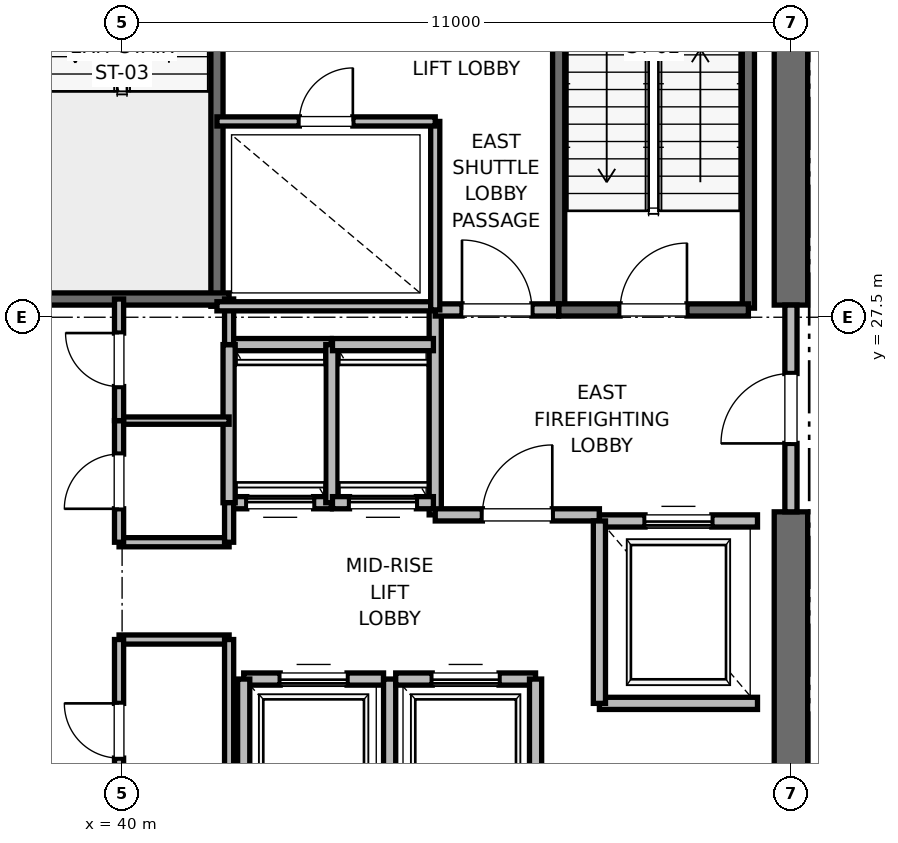
"""IFC4 building model, lengths in metres.
Left out: names, types, materials, properties, quantities, classifications, styles, units other than length and angle.
Written with IfcOpenShell. Run it as: python <this file> out.ifc"""

import sys

from ifc_helpers import new_model, si_unit, direction, frame, frame_2d, origin, place, context, subcontext, project, spatial, rectangle, extrude, element, fill, save


model = new_model("IFC4")
c1 = context("Model", 3, precision=1e-05, world=origin(), true_north=direction((0.0, 1.0)))
c2 = subcontext(c1, "Body", "Model", "MODEL_VIEW")
j1 = project(units=[si_unit("LENGTHUNIT", "METRE"), si_unit("PLANEANGLEUNIT", "RADIAN")], contexts=[c1])
p1 = place(None, origin())
s1 = spatial("IfcSite", under=j1, at=p1, CompositionType="ELEMENT")
p2 = place(p1, origin())
s2 = spatial("IfcBuilding", under=s1, at=p2, CompositionType="ELEMENT")
p3 = place(p2, frame((0.0, 0.0, 140.4)))
s3 = spatial("IfcBuildingStorey", under=s2, at=p3, CompositionType="ELEMENT", Elevation=140.4)
p4 = place(p3, frame((51.0, 18.5, 0.0), z_axis=(0.0, 0.0, 1.0), x_axis=(0.0, 1.0, 0.0)))
e1 = element("IfcWall", 1, at=p4, inside=s3, PredefinedType="SHEAR", context=c2, shape_type="SweptSolid", body=[
    extrude(rectangle(XDim=5.8, YDim=0.55, at=frame_2d((2.9, 0.0))), origin(), (0.0, 0.0, 1.0), 3.775),
])
p5 = place(p3, frame((51.0, 27.7, 0.0), z_axis=(0.0, 0.0, 1.0), x_axis=(0.0, 1.0, 0.0)))
e2 = element("IfcWall", 2, at=p5, inside=s3, PredefinedType="SHEAR", context=c2, shape_type="SweptSolid", body=[
    extrude(rectangle(XDim=8.8, YDim=0.55, at=frame_2d((4.4, 0.0))), origin(), (0.0, 0.0, 1.0), 3.775),
])
p6 = place(p3, frame((50.3, 27.65, 0.0), z_axis=(0.0, 0.0, 1.0), x_axis=(0.0, 1.0, 0.0)))
e3 = element("IfcWall", 3, at=p6, inside=s3, PredefinedType="SOLIDWALL", context=c2, shape_type="SweptSolid", body=[
    extrude(rectangle(XDim=8.15, YDim=0.2, at=frame_2d((4.075, 0.0))), origin(), (0.0, 0.0, 1.0), 3.775),
])
p7 = place(p3, frame((47.18, 27.62, 0.0), z_axis=(0.0, 0.0, 1.0), x_axis=(0.0, 1.0, 0.0)))
e4 = element("IfcWall", 4, at=p7, inside=s3, PredefinedType="SOLIDWALL", context=c2, shape_type="SweptSolid", body=[
    extrude(rectangle(XDim=8.18, YDim=0.2, at=frame_2d((4.09, 0.0))), origin(), (0.0, 0.0, 1.0), 3.775),
])
p8 = place(p3, frame((47.18, 27.62, 0.0), z_axis=(0.0, 0.0, 1.0), x_axis=(1.0, 0.0, 0.0)))
e5 = element("IfcWall", 5, at=p8, inside=s3, PredefinedType="SOLIDWALL", context=c2, shape_type="SweptSolid", body=[
    extrude(rectangle(XDim=3.12, YDim=0.2, at=frame_2d((1.56, 0.0))), origin(), (0.0, 0.0, 1.0), 3.775),
])
p9 = place(p8, frame((1.01, 0.0, 0.0)))
e6 = element("IfcOpeningElement", 6, at=p9, cuts=e5, PredefinedType="OPENING", context=c2, shape_type="SweptSolid", body=[
    extrude(rectangle(XDim=1.1, YDim=2.15, at=frame_2d((0.55, 1.075))), frame((0.0, 0.1, 0.0), z_axis=(0.0, -1.0, 0.0), x_axis=(1.0, 0.0, 0.0)), (0.0, 0.0, 1.0), 0.2),
])
p10 = place(p3, frame((41.56, 27.68, 0.0), z_axis=(0.0, 0.0, 1.0), x_axis=(0.0, 1.0, 0.0)))
e7 = element("IfcWall", 7, at=p10, inside=s3, PredefinedType="SOLIDWALL", context=c2, shape_type="SweptSolid", body=[
    extrude(rectangle(XDim=8.57, YDim=0.2, at=frame_2d((4.285, 0.0))), origin(), (0.0, 0.0, 1.0), 3.775),
])
p11 = place(p3, frame((38.44, 27.8, 0.0), z_axis=(0.0, 0.0, 1.0), x_axis=(1.0, 0.0, 0.0)))
e8 = element("IfcWall", 8, at=p11, inside=s3, PredefinedType="SOLIDWALL", context=c2, shape_type="SweptSolid", body=[
    extrude(rectangle(XDim=3.32, YDim=0.2, at=frame_2d((1.66, 0.0))), origin(), (0.0, 0.0, 1.0), 3.775),
])
p12 = place(p3, frame((45.15, 24.25, 0.0), z_axis=(0.0, 0.0, 1.0), x_axis=(0.0, 1.0, 0.0)))
e9 = element("IfcWall", 9, at=p12, inside=s3, PredefinedType="PARTITIONING", context=c2, shape_type="SweptSolid", body=[
    extrude(rectangle(XDim=3.37, YDim=0.2, at=frame_2d((1.685, 0.0))), origin(), (0.0, 0.0, 1.0), 3.775),
])
p13 = place(p3, frame((45.15, 24.25, 0.0), z_axis=(0.0, 0.0, 1.0), x_axis=(1.0, 0.0, 0.0)))
e10 = element("IfcWall", 10, at=p13, inside=s3, PredefinedType="PARTITIONING", context=c2, shape_type="SweptSolid", body=[
    extrude(rectangle(XDim=2.7, YDim=0.2, at=frame_2d((1.35, 0.0))), origin(), (0.0, 0.0, 1.0), 3.775),
])
p14 = place(p13, frame((0.775, 0.0, 0.0)))
e11 = element("IfcOpeningElement", 11, at=p14, cuts=e10, PredefinedType="OPENING", context=c2, shape_type="SweptSolid", body=[
    extrude(rectangle(XDim=1.15, YDim=2.2, at=frame_2d((0.575, 1.1))), frame((0.0, 0.1, 0.0), z_axis=(0.0, -1.0, 0.0), x_axis=(1.0, 0.0, 0.0)), (0.0, 0.0, 1.0), 0.2),
])
p15 = place(p3, frame((45.15, 27.62, 0.0), z_axis=(0.0, 0.0, 1.0), x_axis=(1.0, 0.0, 0.0)))
e12 = element("IfcWall", 12, at=p15, inside=s3, PredefinedType="PARTITIONING", context=c2, shape_type="SweptSolid", body=[
    extrude(rectangle(XDim=2.03, YDim=0.2, at=frame_2d((1.015, 0.0))), origin(), (0.0, 0.0, 1.0), 3.775),
])
p16 = place(p15, frame((0.44, 0.0, 0.0)))
e13 = element("IfcOpeningElement", 13, at=p16, cuts=e12, PredefinedType="OPENING", context=c2, shape_type="SweptSolid", body=[
    extrude(rectangle(XDim=1.15, YDim=2.2, at=frame_2d((0.575, 1.1))), frame((0.0, 0.1, 0.0), z_axis=(0.0, -1.0, 0.0), x_axis=(1.0, 0.0, 0.0)), (0.0, 0.0, 1.0), 0.2),
])
p17 = place(p3, frame((51.0, 24.3, 0.0), z_axis=(0.0, 0.0, 1.0), x_axis=(0.0, 1.0, 0.0)))
e14 = element("IfcWall", 14, at=p17, inside=s3, PredefinedType="PARTITIONING", context=c2, shape_type="SweptSolid", body=[
    extrude(rectangle(XDim=3.4, YDim=0.2, at=frame_2d((1.7, 0.0))), origin(), (0.0, 0.0, 1.0), 2.755),
])
p18 = place(p17, frame((1.125, 0.0, 0.0)))
e15 = element("IfcOpeningElement", 15, at=p18, cuts=e14, PredefinedType="OPENING", context=c2, shape_type="SweptSolid", body=[
    extrude(rectangle(XDim=1.15, YDim=2.2, at=frame_2d((0.575, 1.1))), frame((0.0, 0.1, 0.0), z_axis=(0.0, -1.0, 0.0), x_axis=(1.0, 0.0, 0.0)), (0.0, 0.0, 1.0), 0.2),
])
p19 = place(p3, frame((47.85, 21.15, 0.0), z_axis=(0.0, 0.0, 1.0), x_axis=(1.0, 0.0, 0.0)))
e16 = element("IfcWall", 16, at=p19, inside=s3, PredefinedType="SOLIDWALL", context=c2, shape_type="SweptSolid", body=[
    extrude(rectangle(XDim=2.6, YDim=0.2, at=frame_2d((1.3, 0.0))), origin(), (0.0, 0.0, 1.0), 3.775),
])
p20 = place(p3, frame((50.45, 24.15, 0.0), z_axis=(0.0, 0.0, 1.0), x_axis=(-1.0, 0.0, 0.0)))
e17 = element("IfcWall", 17, at=p20, inside=s3, PredefinedType="SOLIDWALL", context=c2, shape_type="SweptSolid", body=[
    extrude(rectangle(XDim=2.6, YDim=0.2, at=frame_2d((1.3, 0.0))), origin(), (0.0, 0.0, 1.0), 2.755),
])
p21 = place(p20, frame((0.75, 0.0, 0.0)))
e18 = element("IfcOpeningElement", 18, at=p21, cuts=e17, PredefinedType="OPENING", context=c2, shape_type="SweptSolid", body=[
    extrude(rectangle(XDim=1.1, YDim=2.2, at=frame_2d((0.55, 1.1))), frame((0.0, 0.1, 0.0), z_axis=(0.0, -1.0, 0.0), x_axis=(1.0, 0.0, 0.0)), (0.0, 0.0, 1.0), 0.2),
])
p22 = place(p3, frame((47.85, 24.15, 0.0), z_axis=(0.0, 0.0, 1.0), x_axis=(0.0, -1.0, 0.0)))
e19 = element("IfcWall", 19, at=p22, inside=s3, PredefinedType="SOLIDWALL", context=c2, shape_type="SweptSolid", body=[
    extrude(rectangle(XDim=3.0, YDim=0.2, at=frame_2d((1.5, 0.0))), origin(), (0.0, 0.0, 1.0), 3.775),
])
p23 = place(p3, frame((44.3, 21.55, 0.0), z_axis=(0.0, 0.0, 1.0), x_axis=(-1.0, 0.0, 0.0)))
e20 = element("IfcWall", 20, at=p23, inside=s3, PredefinedType="SOLIDWALL", context=c2, shape_type="SweptSolid", body=[
    extrude(rectangle(XDim=2.3, YDim=0.2, at=frame_2d((1.15, 0.0))), origin(), (0.0, 0.0, 1.0), 3.775),
])
p24 = place(p23, frame((0.6, 0.0, 0.0)))
e21 = element("IfcOpeningElement", 21, at=p24, cuts=e20, PredefinedType="OPENING", context=c2, shape_type="SweptSolid", body=[
    extrude(rectangle(XDim=1.1, YDim=2.2, at=frame_2d((0.55, 1.1))), frame((0.0, 0.1, 0.0), z_axis=(0.0, -1.0, 0.0), x_axis=(1.0, 0.0, 0.0)), (0.0, 0.0, 1.0), 0.2),
])
p25 = place(p3, frame((42.0, 21.55, 0.0), z_axis=(0.0, 0.0, 1.0), x_axis=(0.0, -1.0, 0.0)))
e22 = element("IfcWall", 22, at=p25, inside=s3, PredefinedType="SOLIDWALL", context=c2, shape_type="SweptSolid", body=[
    extrude(rectangle(XDim=2.6, YDim=0.2, at=frame_2d((1.3, 0.0))), origin(), (0.0, 0.0, 1.0), 2.755),
])
p26 = place(p3, frame((44.4, 18.95, 0.0), z_axis=(0.0, 0.0, 1.0), x_axis=(0.0, 1.0, 0.0)))
e23 = element("IfcWall", 23, at=p26, inside=s3, PredefinedType="SOLIDWALL", context=c2, shape_type="SweptSolid", body=[
    extrude(rectangle(XDim=2.6, YDim=0.2, at=frame_2d((1.3, 0.0))), origin(), (0.0, 0.0, 1.0), 3.775),
])
p27 = place(p3, frame((46.8, 21.55, 0.0), z_axis=(0.0, 0.0, 1.0), x_axis=(-1.0, 0.0, 0.0)))
e24 = element("IfcWall", 24, at=p27, inside=s3, PredefinedType="SOLIDWALL", context=c2, shape_type="SweptSolid", body=[
    extrude(rectangle(XDim=2.3, YDim=0.2, at=frame_2d((1.15, 0.0))), origin(), (0.0, 0.0, 1.0), 3.775),
])
p28 = place(p27, frame((0.6, 0.0, 0.0)))
e25 = element("IfcOpeningElement", 25, at=p28, cuts=e24, PredefinedType="OPENING", context=c2, shape_type="SweptSolid", body=[
    extrude(rectangle(XDim=1.1, YDim=2.2, at=frame_2d((0.55, 1.1))), frame((0.0, 0.1, 0.0), z_axis=(0.0, -1.0, 0.0), x_axis=(1.0, 0.0, 0.0)), (0.0, 0.0, 1.0), 0.2),
])
p29 = place(p3, frame((46.8, 18.95, 0.0), z_axis=(0.0, 0.0, 1.0), x_axis=(0.0, 1.0, 0.0)))
e26 = element("IfcWall", 26, at=p29, inside=s3, PredefinedType="SOLIDWALL", context=c2, shape_type="SweptSolid", body=[
    extrude(rectangle(XDim=2.6, YDim=0.2, at=frame_2d((1.3, 0.0))), origin(), (0.0, 0.0, 1.0), 3.775),
])
p30 = place(p3, frame((41.76, 24.45, 0.0), z_axis=(0.0, 0.0, 1.0), x_axis=(1.0, 0.0, 0.0)))
e27 = element("IfcWall", 27, at=p30, inside=s3, PredefinedType="SOLIDWALL", context=c2, shape_type="SweptSolid", body=[
    extrude(rectangle(XDim=1.68, YDim=0.2, at=frame_2d((0.84, 0.0))), origin(), (0.0, 0.0, 1.0), 3.775),
])
p31 = place(p30, frame((0.29, 0.0, 0.0)))
e28 = element("IfcOpeningElement", 28, at=p31, cuts=e27, PredefinedType="OPENING", context=c2, shape_type="SweptSolid", body=[
    extrude(rectangle(XDim=1.1, YDim=2.2, at=frame_2d((0.55, 1.1))), frame((0.0, 0.1, 0.0), z_axis=(0.0, -1.0, 0.0), x_axis=(1.0, 0.0, 0.0)), (0.0, 0.0, 1.0), 0.2),
])
p32 = place(p3, frame((43.44, 27.05, 0.0), z_axis=(0.0, 0.0, 1.0), x_axis=(-1.0, 0.0, 0.0)))
e29 = element("IfcWall", 29, at=p32, inside=s3, PredefinedType="SOLIDWALL", context=c2, shape_type="SweptSolid", body=[
    extrude(rectangle(XDim=1.68, YDim=0.2, at=frame_2d((0.84, 0.0))), origin(), (0.0, 0.0, 1.0), 3.775),
])
for number, where, z_axis, x_axis in (
    (30, (41.76, 27.05, 0.0), (0.0, 0.0, 1.0), (0.0, -1.0, 0.0)),
    (31, (43.45, 24.45, 0.0), (0.0, 0.0, 1.0), (0.0, 1.0, 0.0)),
):
    element("IfcWall", number, at=place(p3, frame(where, z_axis=z_axis, x_axis=x_axis)), inside=s3, PredefinedType="SOLIDWALL", context=c2, shape_type="SweptSolid", body=[
        extrude(rectangle(XDim=2.6, YDim=0.2, at=frame_2d((1.3, 0.0))), origin(), (0.0, 0.0, 1.0), 3.775),
    ])
p33 = place(p3, frame((43.46, 24.45, 0.0), z_axis=(0.0, 0.0, 1.0), x_axis=(1.0, 0.0, 0.0)))
e32 = element("IfcWall", 32, at=p33, inside=s3, PredefinedType="SOLIDWALL", context=c2, shape_type="SweptSolid", body=[
    extrude(rectangle(XDim=1.66, YDim=0.2, at=frame_2d((0.83, 0.0))), origin(), (0.0, 0.0, 1.0), 3.775),
])
p34 = place(p33, frame((0.28, 0.0, 0.0)))
e33 = element("IfcOpeningElement", 33, at=p34, cuts=e32, PredefinedType="OPENING", context=c2, shape_type="SweptSolid", body=[
    extrude(rectangle(XDim=1.1, YDim=2.2, at=frame_2d((0.55, 1.1))), frame((0.0, 0.1, 0.0), z_axis=(0.0, -1.0, 0.0), x_axis=(1.0, 0.0, 0.0)), (0.0, 0.0, 1.0), 0.2),
])
p35 = place(p3, frame((45.12, 27.05, 0.0), z_axis=(0.0, 0.0, 1.0), x_axis=(-1.0, 0.0, 0.0)))
e34 = element("IfcWall", 34, at=p35, inside=s3, PredefinedType="SOLIDWALL", context=c2, shape_type="SweptSolid", body=[
    extrude(rectangle(XDim=1.66, YDim=0.2, at=frame_2d((0.83, 0.0))), origin(), (0.0, 0.0, 1.0), 3.775),
])
for number, where, z_axis, x_axis in (
    (35, (39.95, 22.2, 0.0), (0.0, 0.0, 1.0), (1.0, 0.0, 0.0)),
    (36, (39.95, 23.8, 0.0), (0.0, 0.0, 1.0), (1.0, 0.0, 0.0)),
):
    element("IfcWall", number, at=place(p3, frame(where, z_axis=z_axis, x_axis=x_axis)), inside=s3, PredefinedType="PARTITIONING", context=c2, shape_type="SweptSolid", body=[
        extrude(rectangle(XDim=1.81, YDim=0.15, at=frame_2d((0.905, 0.0))), origin(), (0.0, 0.0, 1.0), 2.85),
    ])
p36 = place(p3, frame((39.95, 25.8, 0.0), z_axis=(0.0, 0.0, 1.0), x_axis=(1.0, 0.0, 0.0)))
e37 = element("IfcWall", 37, at=p36, inside=s3, PredefinedType="PARTITIONING", context=c2, shape_type="SweptSolid", body=[
    extrude(rectangle(XDim=1.81, YDim=0.12, at=frame_2d((0.905, 0.0))), origin(), (0.0, 0.0, 1.0), 2.85),
])
p37 = place(p3, frame((41.76, 18.6, 0.0), z_axis=(0.0, 0.0, 1.0), x_axis=(0.0, 1.0, 0.0)))
e38 = element("IfcWall", 38, at=p37, inside=s3, PredefinedType="PARTITIONING", context=c2, shape_type="SweptSolid", body=[
    extrude(rectangle(XDim=3.6, YDim=0.15, at=frame_2d((1.8, 0.0))), origin(), (0.0, 0.0, 1.0), 2.755),
])
p38 = place(p3, frame((41.76, 23.8, 0.0), z_axis=(0.0, 0.0, 1.0), x_axis=(0.0, 1.0, 0.0)))
e39 = element("IfcWall", 39, at=p38, inside=s3, PredefinedType="PARTITIONING", context=c2, shape_type="SweptSolid", body=[
    extrude(rectangle(XDim=0.65, YDim=0.15, at=frame_2d((0.325, 0.0))), origin(), (0.0, 0.0, 1.0), 2.85),
])
p39 = place(p3, frame((41.76, 27.05, 0.0), z_axis=(0.0, 0.0, 1.0), x_axis=(0.0, 1.0, 0.0)))
e40 = element("IfcWall", 40, at=p39, inside=s3, PredefinedType="PARTITIONING", context=c2, shape_type="SweptSolid", body=[
    extrude(rectangle(XDim=0.75, YDim=0.15, at=frame_2d((0.375, 0.0))), origin(), (0.0, 0.0, 1.0), 2.85),
])
p40 = place(p3, frame((39.95, 19.2, 0.0), z_axis=(0.0, 0.0, 1.0), x_axis=(0.0, 1.0, 0.0)))
e41 = element("IfcWall", 41, at=p40, inside=s3, PredefinedType="PARTITIONING", context=c2, shape_type="SweptSolid", body=[
    extrude(rectangle(XDim=3.0, YDim=0.15, at=frame_2d((1.5, 0.0))), origin(), (0.0, 0.0, 1.0), 2.85),
])
p41 = place(p40, frame((1.05, 0.0, 0.0)))
e42 = element("IfcOpeningElement", 42, at=p41, cuts=e41, PredefinedType="OPENING", context=c2, shape_type="SweptSolid", body=[
    extrude(rectangle(XDim=0.9, YDim=2.1, at=frame_2d((0.45, 1.05))), frame((0.0, 0.075, 0.0), z_axis=(0.0, -1.0, 0.0), x_axis=(1.0, 0.0, 0.0)), (0.0, 0.0, 1.0), 0.15),
])
p42 = place(p3, frame((39.95, 23.8, 0.0), z_axis=(0.0, 0.0, 1.0), x_axis=(0.0, 1.0, 0.0)))
e43 = element("IfcWall", 43, at=p42, inside=s3, PredefinedType="PARTITIONING", context=c2, shape_type="SweptSolid", body=[
    extrude(rectangle(XDim=2.0, YDim=0.15, at=frame_2d((1.0, 0.0))), origin(), (0.0, 0.0, 1.0), 2.85),
])
p43 = place(p42, frame((0.55, 0.0, 0.0)))
e44 = element("IfcOpeningElement", 44, at=p43, cuts=e43, PredefinedType="OPENING", context=c2, shape_type="SweptSolid", body=[
    extrude(rectangle(XDim=0.9, YDim=2.1, at=frame_2d((0.45, 1.05))), frame((0.0, 0.075, 0.0), z_axis=(0.0, -1.0, 0.0), x_axis=(1.0, 0.0, 0.0)), (0.0, 0.0, 1.0), 0.15),
])
p44 = place(p3, frame((39.95, 25.8, 0.0), z_axis=(0.0, 0.0, 1.0), x_axis=(0.0, 1.0, 0.0)))
e45 = element("IfcWall", 45, at=p44, inside=s3, PredefinedType="PARTITIONING", context=c2, shape_type="SweptSolid", body=[
    extrude(rectangle(XDim=2.0, YDim=0.15, at=frame_2d((1.0, 0.0))), origin(), (0.0, 0.0, 1.0), 2.85),
])
p45 = place(p44, frame((0.56, 0.0, 0.0)))
e46 = element("IfcOpeningElement", 46, at=p45, cuts=e45, PredefinedType="OPENING", context=c2, shape_type="SweptSolid", body=[
    extrude(rectangle(XDim=0.88, YDim=2.1, at=frame_2d((0.44, 1.05))), frame((0.0, 0.075, 0.0), z_axis=(0.0, -1.0, 0.0), x_axis=(1.0, 0.0, 0.0)), (0.0, 0.0, 1.0), 0.15),
])
p46 = place(p3, frame((41.56, 27.68, 0.0), z_axis=(0.0, 0.0, 1.0), x_axis=(1.0, 0.0, 0.0)))
e47 = element("IfcWall", 47, at=p46, inside=s3, PredefinedType="PARTITIONING", context=c2, shape_type="SweptSolid", body=[
    extrude(rectangle(XDim=3.59, YDim=0.15, at=frame_2d((1.795, 0.0))), origin(), (0.0, 0.0, 1.0), 2.85),
])
p47 = place(p3, frame((45.15, 27.62, 0.0), z_axis=(0.0, 0.0, 1.0), x_axis=(0.0, 1.0, 0.0)))
e48 = element("IfcWall", 48, at=p47, inside=s3, PredefinedType="PARTITIONING", context=c2, shape_type="SweptSolid", body=[
    extrude(rectangle(XDim=3.1, YDim=0.15, at=frame_2d((1.55, 0.0))), origin(), (0.0, 0.0, 1.0), 2.85),
])
p48 = place(p3, frame((41.56, 30.72, 0.0), z_axis=(0.0, 0.0, 1.0), x_axis=(1.0, 0.0, 0.0)))
e49 = element("IfcWall", 49, at=p48, inside=s3, PredefinedType="PARTITIONING", context=c2, shape_type="SweptSolid", body=[
    extrude(rectangle(XDim=3.59, YDim=0.15, at=frame_2d((1.795, 0.0))), origin(), (0.0, 0.0, 1.0), 2.85),
])
p49 = place(p48, frame((1.355, 0.0, 0.0)))
e50 = element("IfcOpeningElement", 50, at=p49, cuts=e49, PredefinedType="OPENING", context=c2, shape_type="SweptSolid", body=[
    extrude(rectangle(XDim=0.88, YDim=2.1, at=frame_2d((0.44, 1.05))), frame((0.0, 0.075, 0.0), z_axis=(0.0, -1.0, 0.0), x_axis=(1.0, 0.0, 0.0)), (0.0, 0.0, 1.0), 0.15),
])
p50 = place(p9, origin())
e51 = element("IfcDoor", 51, at=p50, inside=s3, OperationType="SINGLE_SWING_RIGHT", PredefinedType="DOOR", context=c2, shape_type="SweptSolid", body=[
    extrude(rectangle(XDim=1.1, YDim=2.15, at=frame_2d((0.55, 1.075))), frame((0.0, 0.025, 0.0), z_axis=(0.0, -1.0, 0.0), x_axis=(1.0, 0.0, 0.0)), (0.0, 0.0, 1.0), 0.05),
])
fill(e6, e51)
p51 = place(p14, origin())
e52 = element("IfcDoor", 52, at=p51, inside=s3, OperationType="SINGLE_SWING_RIGHT", PredefinedType="DOOR", context=c2, shape_type="SweptSolid", body=[
    extrude(rectangle(XDim=1.15, YDim=2.2, at=frame_2d((0.575, 1.1))), frame((0.0, 0.025, 0.0), z_axis=(0.0, -1.0, 0.0), x_axis=(1.0, 0.0, 0.0)), (0.0, 0.0, 1.0), 0.05),
])
fill(e11, e52)
p52 = place(p16, origin())
e53 = element("IfcDoor", 53, at=p52, inside=s3, OperationType="SINGLE_SWING_LEFT", PredefinedType="DOOR", context=c2, shape_type="SweptSolid", body=[
    extrude(rectangle(XDim=1.15, YDim=2.2, at=frame_2d((0.575, 1.1))), frame((0.0, 0.025, 0.0), z_axis=(0.0, -1.0, 0.0), x_axis=(1.0, 0.0, 0.0)), (0.0, 0.0, 1.0), 0.05),
])
fill(e13, e53)
p53 = place(p18, origin())
e54 = element("IfcDoor", 54, at=p53, inside=s3, OperationType="SINGLE_SWING_LEFT", PredefinedType="DOOR", context=c2, shape_type="SweptSolid", body=[
    extrude(rectangle(XDim=1.15, YDim=2.2, at=frame_2d((0.575, 1.1))), frame((0.0, 0.025, 0.0), z_axis=(0.0, -1.0, 0.0), x_axis=(1.0, 0.0, 0.0)), (0.0, 0.0, 1.0), 0.05),
])
fill(e15, e54)
p54 = place(p21, origin())
e55 = element("IfcDoor", 55, at=p54, inside=s3, OperationType="SLIDING_TO_RIGHT", PredefinedType="DOOR", context=c2, shape_type="SweptSolid", body=[
    extrude(rectangle(XDim=1.1, YDim=2.2, at=frame_2d((0.55, 1.1))), frame((0.0, 0.025, 0.0), z_axis=(0.0, -1.0, 0.0), x_axis=(1.0, 0.0, 0.0)), (0.0, 0.0, 1.0), 0.05),
])
fill(e18, e55)
p55 = place(p24, origin())
e56 = element("IfcDoor", 56, at=p55, inside=s3, OperationType="SLIDING_TO_RIGHT", PredefinedType="DOOR", context=c2, shape_type="SweptSolid", body=[
    extrude(rectangle(XDim=1.1, YDim=2.2, at=frame_2d((0.55, 1.1))), frame((0.0, 0.025, 0.0), z_axis=(0.0, -1.0, 0.0), x_axis=(1.0, 0.0, 0.0)), (0.0, 0.0, 1.0), 0.05),
])
fill(e21, e56)
p56 = place(p28, origin())
e57 = element("IfcDoor", 57, at=p56, inside=s3, OperationType="SLIDING_TO_RIGHT", PredefinedType="DOOR", context=c2, shape_type="SweptSolid", body=[
    extrude(rectangle(XDim=1.1, YDim=2.2, at=frame_2d((0.55, 1.1))), frame((0.0, 0.025, 0.0), z_axis=(0.0, -1.0, 0.0), x_axis=(1.0, 0.0, 0.0)), (0.0, 0.0, 1.0), 0.05),
])
fill(e25, e57)
p57 = place(p31, origin())
e58 = element("IfcDoor", 58, at=p57, inside=s3, OperationType="SLIDING_TO_RIGHT", PredefinedType="DOOR", context=c2, shape_type="SweptSolid", body=[
    extrude(rectangle(XDim=1.1, YDim=2.2, at=frame_2d((0.55, 1.1))), frame((0.0, 0.025, 0.0), z_axis=(0.0, -1.0, 0.0), x_axis=(1.0, 0.0, 0.0)), (0.0, 0.0, 1.0), 0.05),
])
fill(e28, e58)
p58 = place(p34, origin())
e59 = element("IfcDoor", 59, at=p58, inside=s3, OperationType="SLIDING_TO_RIGHT", PredefinedType="DOOR", context=c2, shape_type="SweptSolid", body=[
    extrude(rectangle(XDim=1.1, YDim=2.2, at=frame_2d((0.55, 1.1))), frame((0.0, 0.025, 0.0), z_axis=(0.0, -1.0, 0.0), x_axis=(1.0, 0.0, 0.0)), (0.0, 0.0, 1.0), 0.05),
])
fill(e33, e59)
p59 = place(p41, origin())
e60 = element("IfcDoor", 60, at=p59, inside=s3, OperationType="SINGLE_SWING_RIGHT", PredefinedType="DOOR", context=c2, shape_type="SweptSolid", body=[
    extrude(rectangle(XDim=0.9, YDim=2.1, at=frame_2d((0.45, 1.05))), frame((0.0, 0.025, 0.0), z_axis=(0.0, -1.0, 0.0), x_axis=(1.0, 0.0, 0.0)), (0.0, 0.0, 1.0), 0.05),
])
fill(e42, e60)
p60 = place(p43, origin())
e61 = element("IfcDoor", 61, at=p60, inside=s3, OperationType="SINGLE_SWING_LEFT", PredefinedType="DOOR", context=c2, shape_type="SweptSolid", body=[
    extrude(rectangle(XDim=0.9, YDim=2.1, at=frame_2d((0.45, 1.05))), frame((0.0, 0.025, 0.0), z_axis=(0.0, -1.0, 0.0), x_axis=(1.0, 0.0, 0.0)), (0.0, 0.0, 1.0), 0.05),
])
fill(e44, e61)
p61 = place(p45, origin())
e62 = element("IfcDoor", 62, at=p61, inside=s3, OperationType="SINGLE_SWING_RIGHT", PredefinedType="DOOR", context=c2, shape_type="SweptSolid", body=[
    extrude(rectangle(XDim=0.88, YDim=2.1, at=frame_2d((0.44, 1.05))), frame((0.0, 0.025, 0.0), z_axis=(0.0, -1.0, 0.0), x_axis=(1.0, 0.0, 0.0)), (0.0, 0.0, 1.0), 0.05),
])
fill(e46, e62)
p62 = place(p49, origin())
e63 = element("IfcDoor", 63, at=p62, inside=s3, OperationType="SINGLE_SWING_RIGHT", PredefinedType="DOOR", context=c2, shape_type="SweptSolid", body=[
    extrude(rectangle(XDim=0.88, YDim=2.1, at=frame_2d((0.44, 1.05))), frame((0.0, 0.025, 0.0), z_axis=(0.0, -1.0, 0.0), x_axis=(1.0, 0.0, 0.0)), (0.0, 0.0, 1.0), 0.05),
])
fill(e50, e63)
save(model, sys.argv[1])
